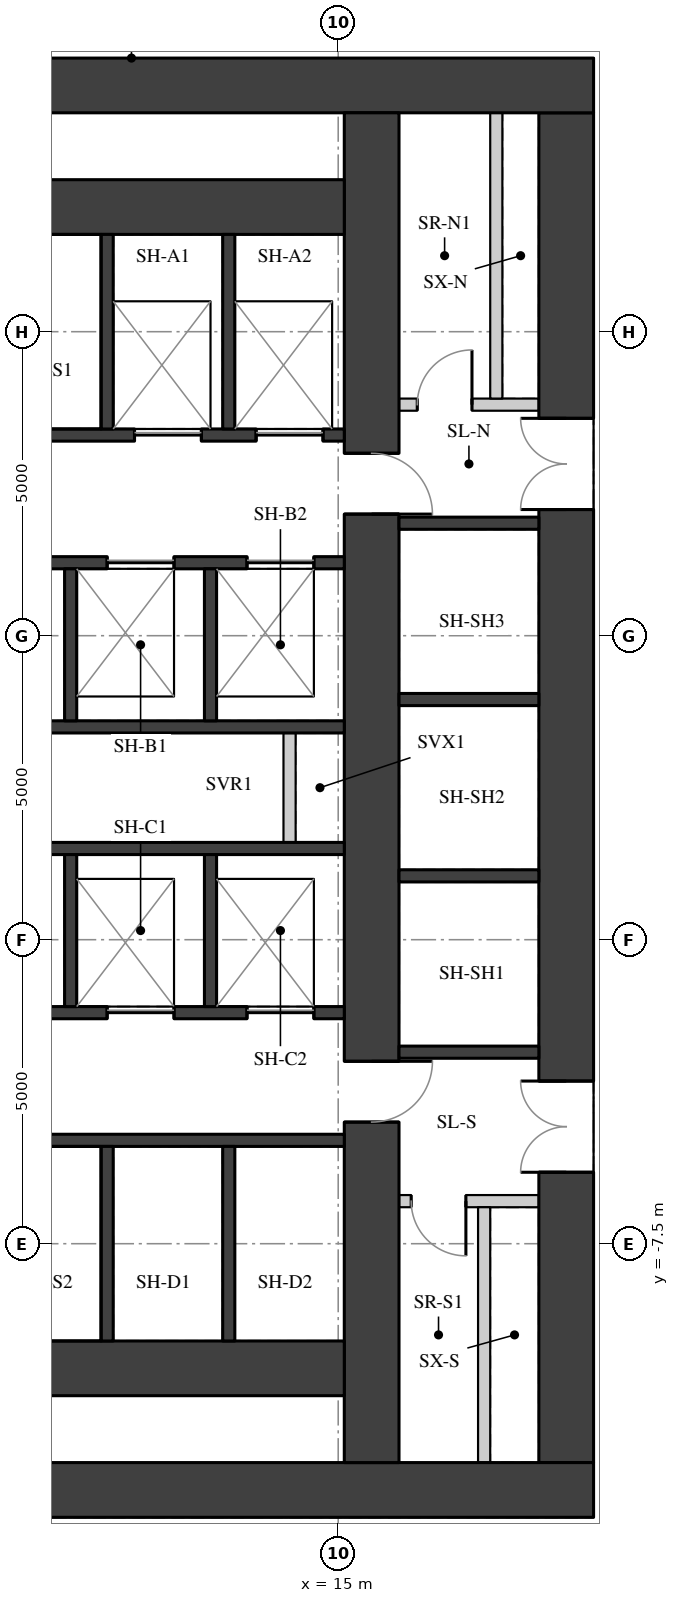
"""IFC4 building model, lengths in metres.
Left out: names, types, materials, properties, quantities, classifications, styles, units other than length and angle.
Written with IfcOpenShell. Run it as: python <this file> out.ifc"""

import sys

from ifc_helpers import new_model, si_unit, direction, frame, frame_2d, origin, place, context, subcontext, project, spatial, rectangle, extrude, element, fill, save


model = new_model("IFC4")
c1 = context("Model", 3, precision=1e-05, world=origin(), true_north=direction((0.0, 1.0)))
c2 = subcontext(c1, "Body", "Model", "MODEL_VIEW")
j1 = project(units=[si_unit("LENGTHUNIT", "METRE"), si_unit("PLANEANGLEUNIT", "RADIAN")], contexts=[c1])
p1 = place(None, origin())
s1 = spatial("IfcSite", under=j1, at=p1, CompositionType="ELEMENT")
p2 = place(p1, origin())
s2 = spatial("IfcBuilding", under=s1, at=p2, CompositionType="ELEMENT")
p3 = place(p2, frame((0.0, 0.0, 102.1)))
s3 = spatial("IfcBuildingStorey", under=s2, at=p3, CompositionType="ELEMENT", Elevation=102.1)
p4 = place(p3, frame((18.75, -11.1, 0.0), z_axis=(0.0, 0.0, 1.0), x_axis=(0.0, 1.0, 0.0)))
e1 = element("IfcWall", 1, at=p4, inside=s3, PredefinedType="SHEAR", context=c2, shape_type="SweptSolid", body=[
    extrude(rectangle(XDim=22.2, YDim=0.9, at=frame_2d((11.1, 0.0))), origin(), (0.0, 0.0, 1.0), 3.02),
])
p5 = place(p4, frame((15.675, 0.0, 0.0)))
e2 = element("IfcOpeningElement", 2, at=p5, cuts=e1, PredefinedType="OPENING", context=c2, shape_type="SweptSolid", body=[
    extrude(rectangle(XDim=1.5, YDim=2.1, at=frame_2d((0.75, 1.05))), frame((0.0, 0.46, 0.0), z_axis=(0.0, -1.0, 0.0), x_axis=(1.0, 0.0, 0.0)), (0.0, 0.0, 1.0), 0.92),
])
p6 = place(p4, frame((4.775, 0.0, 0.0)))
e3 = element("IfcOpeningElement", 3, at=p6, cuts=e1, PredefinedType="OPENING", context=c2, shape_type="SweptSolid", body=[
    extrude(rectangle(XDim=1.5, YDim=2.1, at=frame_2d((0.75, 1.05))), frame((0.0, 0.46, 0.0), z_axis=(0.0, -1.0, 0.0), x_axis=(1.0, 0.0, 0.0)), (0.0, 0.0, 1.0), 0.92),
])
for number, where, z_axis, x_axis in (
    (4, (4.0, 11.55, 0.0), (0.0, 0.0, 1.0), (1.0, 0.0, 0.0)),
    (5, (4.0, -11.55, 0.0), (0.0, 0.0, 1.0), (1.0, 0.0, 0.0)),
):
    element("IfcWall", number, at=place(p3, frame(where, z_axis=z_axis, x_axis=x_axis)), inside=s3, PredefinedType="SHEAR", context=c2, shape_type="SweptSolid", body=[
        extrude(rectangle(XDim=15.2, YDim=0.9, at=frame_2d((7.6, 0.0))), origin(), (0.0, 0.0, 1.0), 3.02),
    ])
p7 = place(p3, frame((15.55, -11.1, 0.0), z_axis=(0.0, 0.0, 1.0), x_axis=(0.0, 1.0, 0.0)))
e6 = element("IfcWall", 6, at=p7, inside=s3, PredefinedType="SHEAR", context=c2, shape_type="SweptSolid", body=[
    extrude(rectangle(XDim=22.2, YDim=0.9, at=frame_2d((11.1, 0.0))), origin(), (0.0, 0.0, 1.0), 3.02),
])
p8 = place(p7, frame((15.6, 0.0, 0.0)))
e7 = element("IfcOpeningElement", 7, at=p8, cuts=e6, PredefinedType="OPENING", context=c2, shape_type="SweptSolid", body=[
    extrude(rectangle(XDim=1.0, YDim=2.1, at=frame_2d((0.5, 1.05))), frame((0.0, 0.46, 0.0), z_axis=(0.0, -1.0, 0.0), x_axis=(1.0, 0.0, 0.0)), (0.0, 0.0, 1.0), 0.92),
])
p9 = place(p7, frame((5.6, 0.0, 0.0)))
e8 = element("IfcOpeningElement", 8, at=p9, cuts=e6, PredefinedType="OPENING", context=c2, shape_type="SweptSolid", body=[
    extrude(rectangle(XDim=1.0, YDim=2.1, at=frame_2d((0.5, 1.05))), frame((0.0, 0.46, 0.0), z_axis=(0.0, -1.0, 0.0), x_axis=(1.0, 0.0, 0.0)), (0.0, 0.0, 1.0), 0.92),
])
for number, where, z_axis, x_axis in (
    (9, (4.9, 9.55, 0.0), (0.0, 0.0, 1.0), (1.0, 0.0, 0.0)),
    (10, (4.9, -9.55, 0.0), (0.0, 0.0, 1.0), (1.0, 0.0, 0.0)),
):
    element("IfcWall", number, at=place(p3, frame(where, z_axis=z_axis, x_axis=x_axis)), inside=s3, PredefinedType="SHEAR", context=c2, shape_type="SweptSolid", body=[
        extrude(rectangle(XDim=10.2, YDim=0.9, at=frame_2d((5.1, 0.0))), origin(), (0.0, 0.0, 1.0), 3.02),
    ])
p10 = place(p3, frame((4.9, 5.8, 0.0), z_axis=(0.0, 0.0, 1.0), x_axis=(1.0, 0.0, 0.0)))
e11 = element("IfcWall", 11, at=p10, inside=s3, PredefinedType="SHEAR", context=c2, shape_type="SweptSolid", body=[
    extrude(rectangle(XDim=10.2, YDim=0.2, at=frame_2d((5.1, 0.0))), origin(), (0.0, 0.0, 1.0), 3.02),
])
p11 = place(p10, frame((6.75, 0.0, 0.0)))
e12 = element("IfcOpeningElement", 12, at=p11, cuts=e11, PredefinedType="OPENING", context=c2, shape_type="SweptSolid", body=[
    extrude(rectangle(XDim=1.1, YDim=2.1, at=frame_2d((0.55, 1.05))), frame((0.0, 0.11, 0.0), z_axis=(0.0, -1.0, 0.0), x_axis=(1.0, 0.0, 0.0)), (0.0, 0.0, 1.0), 0.22),
])
p12 = place(p10, frame((8.75, 0.0, 0.0)))
e13 = element("IfcOpeningElement", 13, at=p12, cuts=e11, PredefinedType="OPENING", context=c2, shape_type="SweptSolid", body=[
    extrude(rectangle(XDim=1.1, YDim=2.1, at=frame_2d((0.55, 1.05))), frame((0.0, 0.11, 0.0), z_axis=(0.0, -1.0, 0.0), x_axis=(1.0, 0.0, 0.0)), (0.0, 0.0, 1.0), 0.22),
])
p13 = place(p3, frame((4.9, 3.7, 0.0), z_axis=(0.0, 0.0, 1.0), x_axis=(1.0, 0.0, 0.0)))
e14 = element("IfcWall", 14, at=p13, inside=s3, PredefinedType="SHEAR", context=c2, shape_type="SweptSolid", body=[
    extrude(rectangle(XDim=10.2, YDim=0.2, at=frame_2d((5.1, 0.0))), origin(), (0.0, 0.0, 1.0), 3.02),
])
p14 = place(p13, frame((6.3, 0.0, 0.0)))
e15 = element("IfcOpeningElement", 15, at=p14, cuts=e14, PredefinedType="OPENING", context=c2, shape_type="SweptSolid", body=[
    extrude(rectangle(XDim=1.1, YDim=2.1, at=frame_2d((0.55, 1.05))), frame((0.0, 0.11, 0.0), z_axis=(0.0, -1.0, 0.0), x_axis=(1.0, 0.0, 0.0)), (0.0, 0.0, 1.0), 0.22),
])
p15 = place(p13, frame((8.6, 0.0, 0.0)))
e16 = element("IfcOpeningElement", 16, at=p15, cuts=e14, PredefinedType="OPENING", context=c2, shape_type="SweptSolid", body=[
    extrude(rectangle(XDim=1.1, YDim=2.1, at=frame_2d((0.55, 1.05))), frame((0.0, 0.11, 0.0), z_axis=(0.0, -1.0, 0.0), x_axis=(1.0, 0.0, 0.0)), (0.0, 0.0, 1.0), 0.22),
])
for number, where, z_axis, x_axis in (
    (17, (4.9, 1.0, 0.0), (0.0, 0.0, 1.0), (1.0, 0.0, 0.0)),
    (18, (4.9, -1.0, 0.0), (0.0, 0.0, 1.0), (1.0, 0.0, 0.0)),
):
    element("IfcWall", number, at=place(p3, frame(where, z_axis=z_axis, x_axis=x_axis)), inside=s3, PredefinedType="SHEAR", context=c2, shape_type="SweptSolid", body=[
        extrude(rectangle(XDim=10.2, YDim=0.2, at=frame_2d((5.1, 0.0))), origin(), (0.0, 0.0, 1.0), 3.02),
    ])
p16 = place(p3, frame((4.9, -3.7, 0.0), z_axis=(0.0, 0.0, 1.0), x_axis=(1.0, 0.0, 0.0)))
e19 = element("IfcWall", 19, at=p16, inside=s3, PredefinedType="SHEAR", context=c2, shape_type="SweptSolid", body=[
    extrude(rectangle(XDim=10.2, YDim=0.2, at=frame_2d((5.1, 0.0))), origin(), (0.0, 0.0, 1.0), 3.02),
])
p17 = place(p16, frame((6.3, 0.0, 0.0)))
e20 = element("IfcOpeningElement", 20, at=p17, cuts=e19, PredefinedType="OPENING", context=c2, shape_type="SweptSolid", body=[
    extrude(rectangle(XDim=1.1, YDim=2.1, at=frame_2d((0.55, 1.05))), frame((0.0, 0.11, 0.0), z_axis=(0.0, -1.0, 0.0), x_axis=(1.0, 0.0, 0.0)), (0.0, 0.0, 1.0), 0.22),
])
p18 = place(p16, frame((8.6, 0.0, 0.0)))
e21 = element("IfcOpeningElement", 21, at=p18, cuts=e19, PredefinedType="OPENING", context=c2, shape_type="SweptSolid", body=[
    extrude(rectangle(XDim=1.1, YDim=2.1, at=frame_2d((0.55, 1.05))), frame((0.0, 0.11, 0.0), z_axis=(0.0, -1.0, 0.0), x_axis=(1.0, 0.0, 0.0)), (0.0, 0.0, 1.0), 0.22),
])
p19 = place(p3, frame((4.9, -5.8, 0.0), z_axis=(0.0, 0.0, 1.0), x_axis=(1.0, 0.0, 0.0)))
e22 = element("IfcWall", 22, at=p19, inside=s3, PredefinedType="SHEAR", context=c2, shape_type="SweptSolid", body=[
    extrude(rectangle(XDim=10.2, YDim=0.2, at=frame_2d((5.1, 0.0))), origin(), (0.0, 0.0, 1.0), 3.02),
])
for number, where, z_axis, x_axis in (
    (23, (11.2, 5.9, 0.0), (0.0, 0.0, 1.0), (0.0, 1.0, 0.0)),
    (24, (11.2, -9.1, 0.0), (0.0, 0.0, 1.0), (0.0, 1.0, 0.0)),
    (25, (13.2, 5.9, 0.0), (0.0, 0.0, 1.0), (0.0, 1.0, 0.0)),
    (26, (13.2, -9.1, 0.0), (0.0, 0.0, 1.0), (0.0, 1.0, 0.0)),
):
    element("IfcWall", number, at=place(p3, frame(where, z_axis=z_axis, x_axis=x_axis)), inside=s3, PredefinedType="SHEAR", context=c2, shape_type="SweptSolid", body=[
        extrude(rectangle(XDim=3.2, YDim=0.2, at=frame_2d((1.6, 0.0))), origin(), (0.0, 0.0, 1.0), 3.02),
    ])
for number, where, z_axis, x_axis in (
    (27, (10.6, 1.1, 0.0), (0.0, 0.0, 1.0), (0.0, 1.0, 0.0)),
    (28, (10.6, -3.6, 0.0), (0.0, 0.0, 1.0), (0.0, 1.0, 0.0)),
    (29, (12.9, 1.1, 0.0), (0.0, 0.0, 1.0), (0.0, 1.0, 0.0)),
    (30, (12.9, -3.6, 0.0), (0.0, 0.0, 1.0), (0.0, 1.0, 0.0)),
):
    element("IfcWall", number, at=place(p3, frame(where, z_axis=z_axis, x_axis=x_axis)), inside=s3, PredefinedType="SHEAR", context=c2, shape_type="SweptSolid", body=[
        extrude(rectangle(XDim=2.5, YDim=0.2, at=frame_2d((1.25, 0.0))), origin(), (0.0, 0.0, 1.0), 3.02),
    ])
p20 = place(p3, frame((14.2, -0.9, 0.0), z_axis=(0.0, 0.0, 1.0), x_axis=(0.0, 1.0, 0.0)))
e31 = element("IfcWall", 31, at=p20, inside=s3, PredefinedType="PARTITIONING", context=c2, shape_type="SweptSolid", body=[
    extrude(rectangle(XDim=1.8, YDim=0.2, at=frame_2d((0.9, 0.0))), origin(), (0.0, 0.0, 1.0), 3.02),
])
for number, where, z_axis, x_axis in (
    (32, (16.0, -4.35, 0.0), (0.0, 0.0, 1.0), (1.0, 0.0, 0.0)),
    (33, (16.0, -1.45, 0.0), (0.0, 0.0, 1.0), (1.0, 0.0, 0.0)),
    (34, (16.0, 1.45, 0.0), (0.0, 0.0, 1.0), (1.0, 0.0, 0.0)),
    (35, (16.0, 4.35, 0.0), (0.0, 0.0, 1.0), (1.0, 0.0, 0.0)),
):
    element("IfcWall", number, at=place(p3, frame(where, z_axis=z_axis, x_axis=x_axis)), inside=s3, PredefinedType="SHEAR", context=c2, shape_type="SweptSolid", body=[
        extrude(rectangle(XDim=2.3, YDim=0.2, at=frame_2d((1.15, 0.0))), origin(), (0.0, 0.0, 1.0), 3.02),
    ])
p21 = place(p3, frame((16.0, 6.3, 0.0), z_axis=(0.0, 0.0, 1.0), x_axis=(1.0, 0.0, 0.0)))
e36 = element("IfcWall", 36, at=p21, inside=s3, PredefinedType="PARTITIONING", context=c2, shape_type="SweptSolid", body=[
    extrude(rectangle(XDim=2.3, YDim=0.2, at=frame_2d((1.15, 0.0))), origin(), (0.0, 0.0, 1.0), 3.02),
])
p22 = place(p21, frame((0.3, 0.0, 0.0)))
e37 = element("IfcOpeningElement", 37, at=p22, cuts=e36, PredefinedType="OPENING", context=c2, shape_type="SweptSolid", body=[
    extrude(rectangle(XDim=0.9, YDim=2.1, at=frame_2d((0.45, 1.05))), frame((0.0, 0.11, 0.0), z_axis=(0.0, -1.0, 0.0), x_axis=(1.0, 0.0, 0.0)), (0.0, 0.0, 1.0), 0.22),
])
p23 = place(p3, frame((17.6, 6.4, 0.0), z_axis=(0.0, 0.0, 1.0), x_axis=(0.0, 1.0, 0.0)))
e38 = element("IfcWall", 38, at=p23, inside=s3, PredefinedType="PARTITIONING", context=c2, shape_type="SweptSolid", body=[
    extrude(rectangle(XDim=4.7, YDim=0.2, at=frame_2d((2.35, 0.0))), origin(), (0.0, 0.0, 1.0), 3.02),
])
p24 = place(p3, frame((16.0, -6.8, 0.0), z_axis=(0.0, 0.0, 1.0), x_axis=(1.0, 0.0, 0.0)))
e39 = element("IfcWall", 39, at=p24, inside=s3, PredefinedType="PARTITIONING", context=c2, shape_type="SweptSolid", body=[
    extrude(rectangle(XDim=2.3, YDim=0.2, at=frame_2d((1.15, 0.0))), origin(), (0.0, 0.0, 1.0), 3.02),
])
p25 = place(p24, frame((0.2, 0.0, 0.0)))
e40 = element("IfcOpeningElement", 40, at=p25, cuts=e39, PredefinedType="OPENING", context=c2, shape_type="SweptSolid", body=[
    extrude(rectangle(XDim=0.9, YDim=2.1, at=frame_2d((0.45, 1.05))), frame((0.0, 0.11, 0.0), z_axis=(0.0, -1.0, 0.0), x_axis=(1.0, 0.0, 0.0)), (0.0, 0.0, 1.0), 0.22),
])
p26 = place(p3, frame((17.4, -11.1, 0.0), z_axis=(0.0, 0.0, 1.0), x_axis=(0.0, 1.0, 0.0)))
e41 = element("IfcWall", 41, at=p26, inside=s3, PredefinedType="PARTITIONING", context=c2, shape_type="SweptSolid", body=[
    extrude(rectangle(XDim=4.2, YDim=0.2, at=frame_2d((2.1, 0.0))), origin(), (0.0, 0.0, 1.0), 3.02),
])
p27 = place(p5, origin())
e42 = element("IfcDoor", 42, at=p27, inside=s3, OperationType="DOUBLE_DOOR_SINGLE_SWING", PredefinedType="DOOR", context=c2, shape_type="SweptSolid", body=[
    extrude(rectangle(XDim=1.5, YDim=2.1, at=frame_2d((0.75, 1.05))), frame((0.0, 0.025, 0.0), z_axis=(0.0, -1.0, 0.0), x_axis=(1.0, 0.0, 0.0)), (0.0, 0.0, 1.0), 0.05),
])
fill(e2, e42)
p28 = place(p6, origin())
e43 = element("IfcDoor", 43, at=p28, inside=s3, OperationType="DOUBLE_DOOR_SINGLE_SWING", PredefinedType="DOOR", context=c2, shape_type="SweptSolid", body=[
    extrude(rectangle(XDim=1.5, YDim=2.1, at=frame_2d((0.75, 1.05))), frame((0.0, 0.025, 0.0), z_axis=(0.0, -1.0, 0.0), x_axis=(1.0, 0.0, 0.0)), (0.0, 0.0, 1.0), 0.05),
])
fill(e3, e43)
p29 = place(p11, origin())
e44 = element("IfcDoor", 44, at=p29, inside=s3, OperationType="DOUBLE_DOOR_SLIDING", PredefinedType="DOOR", context=c2, shape_type="SweptSolid", body=[
    extrude(rectangle(XDim=1.1, YDim=2.1, at=frame_2d((0.55, 1.05))), frame((0.0, 0.025, 0.0), z_axis=(0.0, -1.0, 0.0), x_axis=(1.0, 0.0, 0.0)), (0.0, 0.0, 1.0), 0.05),
])
fill(e12, e44)
p30 = place(p12, origin())
e45 = element("IfcDoor", 45, at=p30, inside=s3, OperationType="DOUBLE_DOOR_SLIDING", PredefinedType="DOOR", context=c2, shape_type="SweptSolid", body=[
    extrude(rectangle(XDim=1.1, YDim=2.1, at=frame_2d((0.55, 1.05))), frame((0.0, 0.025, 0.0), z_axis=(0.0, -1.0, 0.0), x_axis=(1.0, 0.0, 0.0)), (0.0, 0.0, 1.0), 0.05),
])
fill(e13, e45)
p31 = place(p14, origin())
e46 = element("IfcDoor", 46, at=p31, inside=s3, OperationType="DOUBLE_DOOR_SLIDING", PredefinedType="DOOR", context=c2, shape_type="SweptSolid", body=[
    extrude(rectangle(XDim=1.1, YDim=2.1, at=frame_2d((0.55, 1.05))), frame((0.0, 0.025, 0.0), z_axis=(0.0, -1.0, 0.0), x_axis=(1.0, 0.0, 0.0)), (0.0, 0.0, 1.0), 0.05),
])
fill(e15, e46)
p32 = place(p15, origin())
e47 = element("IfcDoor", 47, at=p32, inside=s3, OperationType="DOUBLE_DOOR_SLIDING", PredefinedType="DOOR", context=c2, shape_type="SweptSolid", body=[
    extrude(rectangle(XDim=1.1, YDim=2.1, at=frame_2d((0.55, 1.05))), frame((0.0, 0.025, 0.0), z_axis=(0.0, -1.0, 0.0), x_axis=(1.0, 0.0, 0.0)), (0.0, 0.0, 1.0), 0.05),
])
fill(e16, e47)
p33 = place(p17, origin())
e48 = element("IfcDoor", 48, at=p33, inside=s3, OperationType="DOUBLE_DOOR_SLIDING", PredefinedType="DOOR", context=c2, shape_type="SweptSolid", body=[
    extrude(rectangle(XDim=1.1, YDim=2.1, at=frame_2d((0.55, 1.05))), frame((0.0, 0.025, 0.0), z_axis=(0.0, -1.0, 0.0), x_axis=(1.0, 0.0, 0.0)), (0.0, 0.0, 1.0), 0.05),
])
fill(e20, e48)
p34 = place(p18, origin())
e49 = element("IfcDoor", 49, at=p34, inside=s3, OperationType="DOUBLE_DOOR_SLIDING", PredefinedType="DOOR", context=c2, shape_type="SweptSolid", body=[
    extrude(rectangle(XDim=1.1, YDim=2.1, at=frame_2d((0.55, 1.05))), frame((0.0, 0.025, 0.0), z_axis=(0.0, -1.0, 0.0), x_axis=(1.0, 0.0, 0.0)), (0.0, 0.0, 1.0), 0.05),
])
fill(e21, e49)
p35 = place(p8, origin())
e50 = element("IfcDoor", 50, at=p35, inside=s3, OperationType="SINGLE_SWING_RIGHT", PredefinedType="DOOR", context=c2, shape_type="SweptSolid", body=[
    extrude(rectangle(XDim=1.0, YDim=2.1, at=frame_2d((0.5, 1.05))), frame((0.0, 0.025, 0.0), z_axis=(0.0, -1.0, 0.0), x_axis=(1.0, 0.0, 0.0)), (0.0, 0.0, 1.0), 0.05),
])
fill(e7, e50)
p36 = place(p22, origin())
e51 = element("IfcDoor", 51, at=p36, inside=s3, OperationType="SINGLE_SWING_RIGHT", PredefinedType="DOOR", context=c2, shape_type="SweptSolid", body=[
    extrude(rectangle(XDim=0.9, YDim=2.1, at=frame_2d((0.45, 1.05))), frame((0.0, 0.025, 0.0), z_axis=(0.0, -1.0, 0.0), x_axis=(1.0, 0.0, 0.0)), (0.0, 0.0, 1.0), 0.05),
])
fill(e37, e51)
p37 = place(p9, origin())
e52 = element("IfcDoor", 52, at=p37, inside=s3, OperationType="SINGLE_SWING_LEFT", PredefinedType="DOOR", context=c2, shape_type="SweptSolid", body=[
    extrude(rectangle(XDim=1.0, YDim=2.1, at=frame_2d((0.5, 1.05))), frame((0.0, 0.025, 0.0), z_axis=(0.0, -1.0, 0.0), x_axis=(1.0, 0.0, 0.0)), (0.0, 0.0, 1.0), 0.05),
])
fill(e8, e52)
p38 = place(p25, origin())
e53 = element("IfcDoor", 53, at=p38, inside=s3, OperationType="SINGLE_SWING_LEFT", PredefinedType="DOOR", context=c2, shape_type="SweptSolid", body=[
    extrude(rectangle(XDim=0.9, YDim=2.1, at=frame_2d((0.45, 1.05))), frame((0.0, 0.025, 0.0), z_axis=(0.0, -1.0, 0.0), x_axis=(1.0, 0.0, 0.0)), (0.0, 0.0, 1.0), 0.05),
])
fill(e40, e53)
save(model, sys.argv[1])
